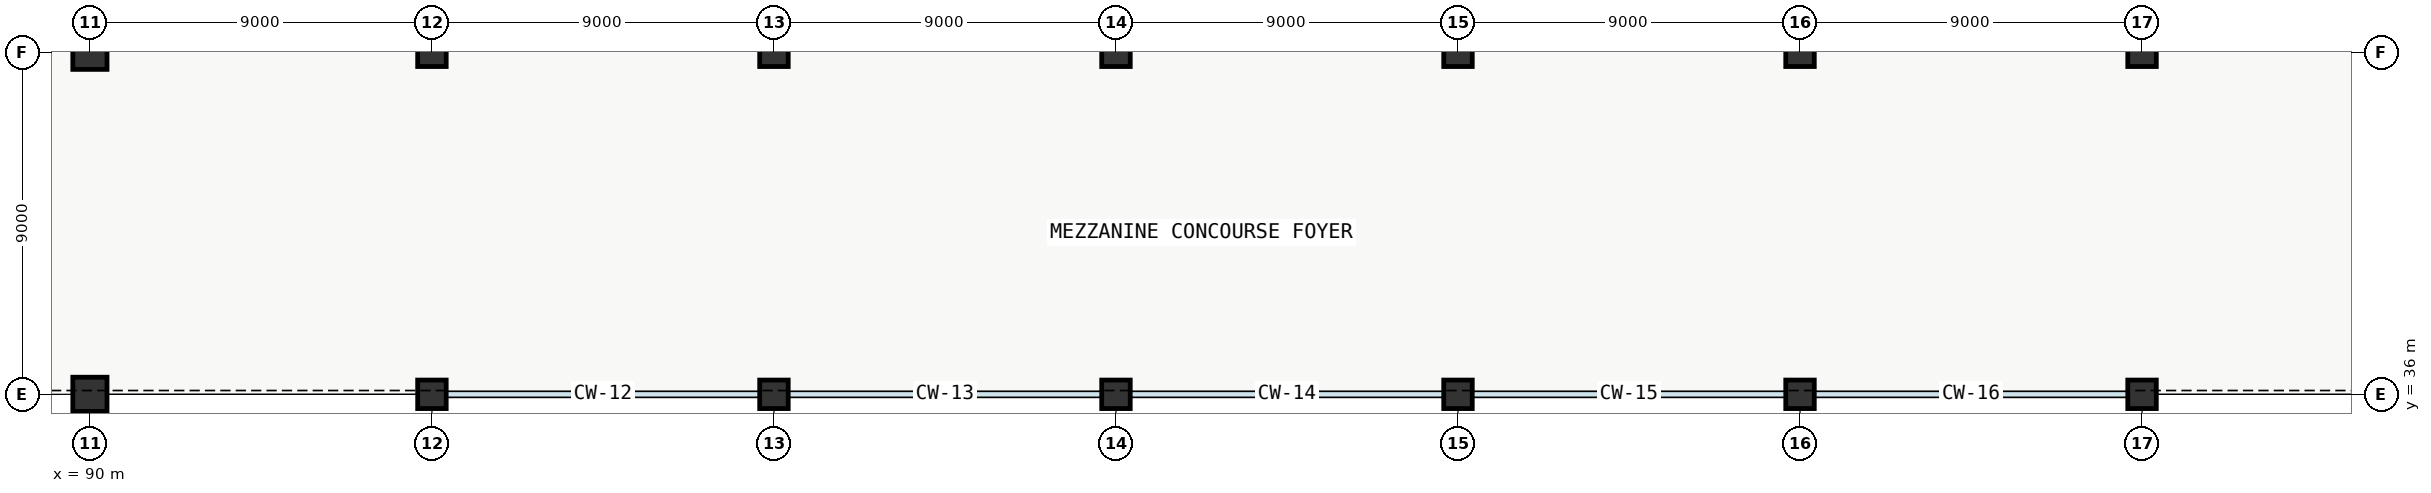
"""IFC4 building model, lengths in metres.
Left out: names, types, materials, properties, quantities, classifications, styles, units other than length and angle.
Written with IfcOpenShell. Run it as: python <this file> out.ifc"""

import sys

from ifc_helpers import new_model, si_unit, direction, frame, origin, origin_2d, place, context, subcontext, project, spatial, rectangle, extrude, element, save


model = new_model("IFC4")
c1 = context("Model", 3, precision=1e-05, world=origin(), true_north=direction((0.0, 1.0)))
c2 = subcontext(c1, "Body", "Model", "MODEL_VIEW")
j1 = project(units=[si_unit("LENGTHUNIT", "METRE"), si_unit("PLANEANGLEUNIT", "RADIAN")], contexts=[c1])
p1 = place(None, origin())
s1 = spatial("IfcSite", under=j1, at=p1, CompositionType="ELEMENT")
p2 = place(p1, origin())
s2 = spatial("IfcBuilding", under=s1, at=p2, CompositionType="ELEMENT")
p3 = place(p2, frame((0.0, 0.0, 12.0)))
s3 = spatial("IfcBuildingStorey", under=s2, at=p3, CompositionType="ELEMENT", Elevation=12.0)
for number, where, z_axis, x_axis in (
    (1, (90.0, 36.0, 0.0), (0.0, 0.0, 1.0), (1.0, 0.0, 0.0)),
    (2, (90.0, 45.0, 0.0), (0.0, 0.0, 1.0), (1.0, 0.0, 0.0)),
):
    element("IfcColumn", number, at=place(p3, frame(where, z_axis=z_axis, x_axis=x_axis)), inside=s3, PredefinedType="COLUMN", context=c2, shape_type="SweptSolid", body=[
        extrude(rectangle(XDim=0.9, YDim=0.9, at=origin_2d()), origin(), (0.0, 0.0, 1.0), 4.8),
    ])
for number, where, z_axis, x_axis in (
    (3, (99.0, 36.0, 0.0), (0.0, 0.0, 1.0), (1.0, 0.0, 0.0)),
    (4, (99.0, 45.0, 0.0), (0.0, 0.0, 1.0), (1.0, 0.0, 0.0)),
    (5, (108.0, 36.0, 0.0), (0.0, 0.0, 1.0), (1.0, 0.0, 0.0)),
    (6, (108.0, 45.0, 0.0), (0.0, 0.0, 1.0), (1.0, 0.0, 0.0)),
    (7, (117.0, 36.0, 0.0), (0.0, 0.0, 1.0), (1.0, 0.0, 0.0)),
    (8, (117.0, 45.0, 0.0), (0.0, 0.0, 1.0), (1.0, 0.0, 0.0)),
    (9, (126.0, 36.0, 0.0), (0.0, 0.0, 1.0), (1.0, 0.0, 0.0)),
    (10, (126.0, 45.0, 0.0), (0.0, 0.0, 1.0), (1.0, 0.0, 0.0)),
    (11, (135.0, 36.0, 0.0), (0.0, 0.0, 1.0), (1.0, 0.0, 0.0)),
    (12, (135.0, 45.0, 0.0), (0.0, 0.0, 1.0), (1.0, 0.0, 0.0)),
    (13, (144.0, 36.0, 0.0), (0.0, 0.0, 1.0), (1.0, 0.0, 0.0)),
    (14, (144.0, 45.0, 0.0), (0.0, 0.0, 1.0), (1.0, 0.0, 0.0)),
):
    element("IfcColumn", number, at=place(p3, frame(where, z_axis=z_axis, x_axis=x_axis)), inside=s3, PredefinedType="COLUMN", context=c2, shape_type="SweptSolid", body=[
        extrude(rectangle(XDim=0.75, YDim=0.75, at=origin_2d()), origin(), (0.0, 0.0, 1.0), 4.8),
    ])
save(model, sys.argv[1])
